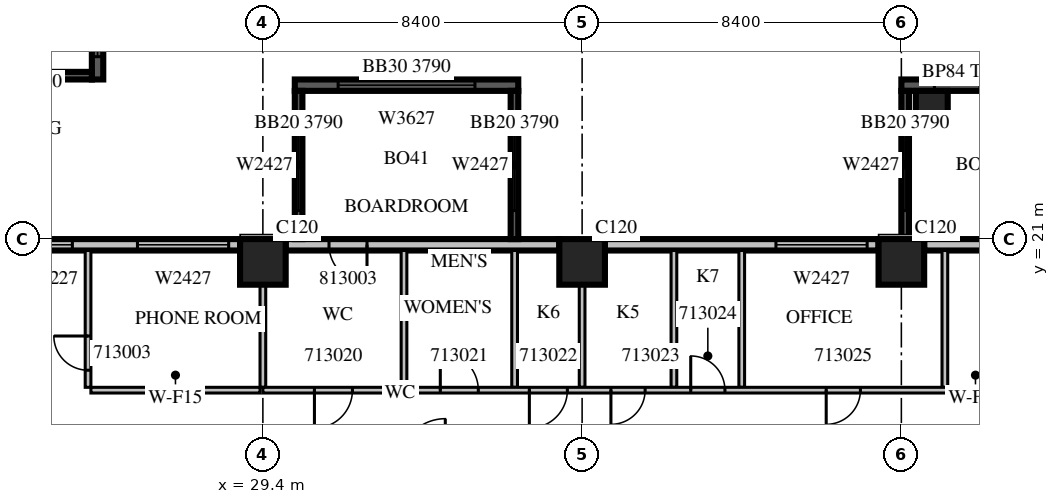
"""IFC4 building model, lengths in metres.
Left out: names, types, materials, properties, quantities, classifications, styles, units other than length and angle.
Written with IfcOpenShell. Run it as: python <this file> out.ifc"""

import sys

from ifc_helpers import new_model, si_unit, direction, frame, frame_2d, origin, origin_2d, place, context, subcontext, project, spatial, rectangle, extrude, source, transform, mapped, element, fill, save


model = new_model("IFC4")
c1 = context("Model", 3, precision=1e-05, world=origin(), true_north=direction((0.0, 1.0)))
c2 = subcontext(c1, "Body", "Model", "MODEL_VIEW")
j1 = project(units=[si_unit("LENGTHUNIT", "METRE"), si_unit("PLANEANGLEUNIT", "RADIAN")], contexts=[c1])
p1 = place(None, origin())
s1 = spatial("IfcSite", under=j1, at=p1, CompositionType="ELEMENT")
p2 = place(p1, origin())
s2 = spatial("IfcBuilding", under=s1, at=p2, CompositionType="ELEMENT")
p3 = place(p2, frame((0.0, 0.0, 65.7)))
s3 = spatial("IfcBuildingStorey", under=s2, at=p3, CompositionType="ELEMENT", Elevation=65.7)
m1 = source(origin(), c2, "Body", "SweptSolid", [
    extrude(rectangle(XDim=1.2, YDim=1.2, at=origin_2d()), origin(), (0.0, 0.0, 1.0), 4.2),
])
for number, where, z_axis, x_axis in (
    (1, (29.4, 20.4, 0.0), (0.0, 0.0, 1.0), (1.0, 0.0, 0.0)),
    (2, (37.8, 20.4, 0.0), (0.0, 0.0, 1.0), (1.0, 0.0, 0.0)),
    (3, (46.2, 20.4, 0.0), (0.0, 0.0, 1.0), (1.0, 0.0, 0.0)),
):
    element("IfcColumn", number, at=place(p3, frame(where, z_axis=z_axis, x_axis=x_axis)), inside=s3, PredefinedType="COLUMN", context=c2, shape_type="MappedRepresentation", body=[
        mapped(m1, transform((0.0, 0.0, 0.0), scale=1.0)),
    ])
m2 = source(origin(), c2, "Body", "SweptSolid", [
    extrude(rectangle(XDim=0.84, YDim=0.84, at=origin_2d()), origin(), (0.0, 0.0, 1.0), 4.2),
])
p4 = place(p3, frame((47.0, 24.48, 0.0), z_axis=(0.0, 0.0, 1.0), x_axis=(1.0, 0.0, 0.0)))
e4 = element("IfcColumn", 4, at=p4, inside=s3, PredefinedType="COLUMN", context=c2, shape_type="MappedRepresentation", body=[
    mapped(m2, transform((0.0, 0.0, 0.0), scale=1.0)),
])
m3 = source(origin(), c2, "Body", "SweptSolid", [
    extrude(rectangle(XDim=11.76, YDim=0.3, at=frame_2d((5.88, 0.0))), origin(), (0.0, 0.0, 1.0), 3.79),
])
p5 = place(p3, frame((57.96, 25.05, 0.0), z_axis=(0.0, 0.0, 1.0), x_axis=(-1.0, 0.0, 0.0)))
e5 = element("IfcWall", 5, at=p5, inside=s3, PredefinedType="SOLIDWALL", context=c2, shape_type="MappedRepresentation", body=[
    mapped(m3, transform((0.0, 0.0, 0.0), scale=1.0)),
])
m4 = source(origin(), c2, "Body", "SweptSolid", [
    extrude(rectangle(XDim=1.2, YDim=2.7, at=frame_2d((0.6, 1.35))), frame((0.0, 0.16, 0.0), z_axis=(0.0, -1.0, 0.0), x_axis=(1.0, 0.0, 0.0)), (0.0, 0.0, 1.0), 0.32),
])
p6 = place(p5, frame((0.87, 0.0, 0.6)))
e6 = element("IfcOpeningElement", 6, at=p6, cuts=e5, PredefinedType="OPENING", context=c2, shape_type="MappedRepresentation", body=[
    mapped(m4, transform((0.0, 0.0, 0.0), scale=1.0)),
])
p7 = place(p5, frame((3.81, 0.0, 0.6)))
e7 = element("IfcOpeningElement", 7, at=p7, cuts=e5, PredefinedType="OPENING", context=c2, shape_type="MappedRepresentation", body=[
    mapped(m4, transform((0.0, 0.0, 0.0), scale=1.0)),
])
p8 = place(p5, frame((6.75, 0.0, 0.6)))
e8 = element("IfcOpeningElement", 8, at=p8, cuts=e5, PredefinedType="OPENING", context=c2, shape_type="MappedRepresentation", body=[
    mapped(m4, transform((0.0, 0.0, 0.0), scale=1.0)),
])
p9 = place(p5, frame((9.69, 0.0, 0.6)))
e9 = element("IfcOpeningElement", 9, at=p9, cuts=e5, PredefinedType="OPENING", context=c2, shape_type="MappedRepresentation", body=[
    mapped(m4, transform((0.0, 0.0, 0.0), scale=1.0)),
])
m5 = source(origin(), c2, "Body", "SweptSolid", [
    extrude(rectangle(XDim=3.9, YDim=0.2, at=frame_2d((1.95, 0.0))), origin(), (0.0, 0.0, 1.0), 3.79),
])
p10 = place(p3, frame((46.3, 21.0, 0.0), z_axis=(0.0, 0.0, 1.0), x_axis=(0.0, 1.0, 0.0)))
e10 = element("IfcWall", 10, at=p10, inside=s3, PredefinedType="SOLIDWALL", context=c2, shape_type="MappedRepresentation", body=[
    mapped(m5, transform((0.0, 0.0, 0.0), scale=1.0)),
])
m6 = source(origin(), c2, "Body", "SweptSolid", [
    extrude(rectangle(XDim=2.4, YDim=2.7, at=frame_2d((1.2, 1.35))), frame((0.0, 0.11, 0.0), z_axis=(0.0, -1.0, 0.0), x_axis=(1.0, 0.0, 0.0)), (0.0, 0.0, 1.0), 0.22),
])
p11 = place(p10, frame((0.75, 0.0, 0.6)))
e11 = element("IfcOpeningElement", 11, at=p11, cuts=e10, PredefinedType="OPENING", context=c2, shape_type="MappedRepresentation", body=[
    mapped(m6, transform((0.0, 0.0, 0.0), scale=1.0)),
])
m7 = source(origin(), c2, "Body", "SweptSolid", [
    extrude(rectangle(XDim=4.2, YDim=0.3, at=frame_2d((2.1, 0.0))), origin(), (0.0, 0.0, 1.0), 3.8),
])
p12 = place(p3, frame((25.05, 25.2, 0.0), z_axis=(0.0, 0.0, 1.0), x_axis=(0.0, 1.0, 0.0)))
e12 = element("IfcWall", 12, at=p12, inside=s3, PredefinedType="SOLIDWALL", context=c2, shape_type="MappedRepresentation", body=[
    mapped(m7, transform((0.0, 0.0, 0.0), scale=1.0)),
])
m8 = source(origin(), c2, "Body", "SweptSolid", [
    extrude(rectangle(XDim=3.0, YDim=2.7, at=frame_2d((1.5, 1.35))), frame((0.0, 0.16, 0.0), z_axis=(0.0, -1.0, 0.0), x_axis=(1.0, 0.0, 0.0)), (0.0, 0.0, 1.0), 0.32),
])
p13 = place(p12, frame((0.6, 0.0, 0.6)))
e13 = element("IfcOpeningElement", 13, at=p13, cuts=e12, PredefinedType="OPENING", context=c2, shape_type="MappedRepresentation", body=[
    mapped(m8, transform((0.0, 0.0, 0.0), scale=1.0)),
])
m9 = source(origin(), c2, "Body", "SweptSolid", [
    extrude(rectangle(XDim=3.9, YDim=0.2, at=frame_2d((1.95, 0.0))), origin(), (0.0, 0.0, 1.0), 3.8),
])
p14 = place(p3, frame((21.0, 25.3, 0.0), z_axis=(0.0, 0.0, 1.0), x_axis=(1.0, 0.0, 0.0)))
e14 = element("IfcWall", 14, at=p14, inside=s3, PredefinedType="SOLIDWALL", context=c2, shape_type="MappedRepresentation", body=[
    mapped(m9, transform((0.0, 0.0, 0.0), scale=1.0)),
])
p15 = place(p14, frame((0.75, 0.0, 0.6)))
e15 = element("IfcOpeningElement", 15, at=p15, cuts=e14, PredefinedType="OPENING", context=c2, shape_type="MappedRepresentation", body=[
    mapped(m6, transform((0.0, 0.0, 0.0), scale=1.0)),
])
m10 = source(origin(), c2, "Body", "SweptSolid", [
    extrude(rectangle(XDim=4.68, YDim=0.3, at=frame_2d((2.34, 0.0))), origin(), (0.0, 0.0, 1.0), 3.8),
])
p16 = place(p3, frame((51.48, 20.85, 0.0), z_axis=(0.0, 0.0, 1.0), x_axis=(-1.0, 0.0, 0.0)))
e16 = element("IfcWall", 16, at=p16, inside=s3, PredefinedType="STANDARD", context=c2, shape_type="MappedRepresentation", body=[
    mapped(m10, transform((0.0, 0.0, 0.0), scale=1.0)),
])
m11 = source(origin(), c2, "Body", "SweptSolid", [
    extrude(rectangle(XDim=1.0, YDim=2.1, at=frame_2d((0.5, 1.05))), frame((0.0, 0.16, 0.0), z_axis=(0.0, -1.0, 0.0), x_axis=(1.0, 0.0, 0.0)), (0.0, 0.0, 1.0), 0.32),
])
p17 = place(p16, frame((1.887, 0.0, 0.0)))
e17 = element("IfcOpeningElement", 17, at=p17, cuts=e16, PredefinedType="OPENING", context=c2, shape_type="MappedRepresentation", body=[
    mapped(m11, transform((0.0, 0.0, 0.0), scale=1.0)),
])
m12 = source(origin(), c2, "Body", "SweptSolid", [
    extrude(rectangle(XDim=7.2, YDim=0.3, at=frame_2d((3.6, 0.0))), origin(), (0.0, 0.0, 1.0), 3.8),
])
p18 = place(p3, frame((45.6, 20.85, 0.0), z_axis=(0.0, 0.0, 1.0), x_axis=(-1.0, 0.0, 0.0)))
e18 = element("IfcWall", 18, at=p18, inside=s3, PredefinedType="STANDARD", context=c2, shape_type="MappedRepresentation", body=[
    mapped(m12, transform((0.0, 0.0, 0.0), scale=1.0)),
])
m13 = source(origin(), c2, "Body", "SweptSolid", [
    extrude(rectangle(XDim=2.4, YDim=2.7, at=frame_2d((1.2, 1.35))), frame((0.0, 0.16, 0.0), z_axis=(0.0, -1.0, 0.0), x_axis=(1.0, 0.0, 0.0)), (0.0, 0.0, 1.0), 0.32),
])
p19 = place(p18, frame((0.3, 0.0, 0.6)))
e19 = element("IfcOpeningElement", 19, at=p19, cuts=e18, PredefinedType="OPENING", context=c2, shape_type="MappedRepresentation", body=[
    mapped(m13, transform((0.0, 0.0, 0.0), scale=1.0)),
])
p20 = place(p3, frame((37.2, 20.85, 0.0), z_axis=(0.0, 0.0, 1.0), x_axis=(-1.0, 0.0, 0.0)))
e20 = element("IfcWall", 20, at=p20, inside=s3, PredefinedType="STANDARD", context=c2, shape_type="MappedRepresentation", body=[
    mapped(m12, transform((0.0, 0.0, 0.0), scale=1.0)),
])
p21 = place(p20, frame((5.06, 0.0, 0.0)))
e21 = element("IfcOpeningElement", 21, at=p21, cuts=e20, PredefinedType="OPENING", context=c2, shape_type="MappedRepresentation", body=[
    mapped(m11, transform((0.0, 0.0, 0.0), scale=1.0)),
])
m14 = source(origin(), c2, "Body", "SweptSolid", [
    extrude(rectangle(XDim=6.6, YDim=0.3, at=frame_2d((3.3, 0.0))), origin(), (0.0, 0.0, 1.0), 3.8),
])
p22 = place(p3, frame((28.8, 20.85, 0.0), z_axis=(0.0, 0.0, 1.0), x_axis=(-1.0, 0.0, 0.0)))
e22 = element("IfcWall", 22, at=p22, inside=s3, PredefinedType="STANDARD", context=c2, shape_type="MappedRepresentation", body=[
    mapped(m14, transform((0.0, 0.0, 0.0), scale=1.0)),
])
p23 = place(p22, frame((0.3, 0.0, 0.6)))
e23 = element("IfcOpeningElement", 23, at=p23, cuts=e22, PredefinedType="OPENING", context=c2, shape_type="MappedRepresentation", body=[
    mapped(m13, transform((0.0, 0.0, 0.0), scale=1.0)),
])
p24 = place(p22, frame((4.412, 0.0, 0.6)))
e24 = element("IfcOpeningElement", 24, at=p24, cuts=e22, PredefinedType="OPENING", context=c2, shape_type="MappedRepresentation", body=[
    mapped(m4, transform((0.0, 0.0, 0.0), scale=1.0)),
])
m15 = source(origin(), c2, "Body", "SweptSolid", [
    extrude(rectangle(XDim=5.88, YDim=0.3, at=frame_2d((2.94, 0.0))), origin(), (0.0, 0.0, 1.0), 3.79),
])
p25 = place(p3, frame((36.12, 25.05, 0.0), z_axis=(0.0, 0.0, 1.0), x_axis=(-1.0, 0.0, 0.0)))
e25 = element("IfcWall", 25, at=p25, inside=s3, PredefinedType="SOLIDWALL", context=c2, shape_type="MappedRepresentation", body=[
    mapped(m15, transform((0.0, 0.0, 0.0), scale=1.0)),
])
m16 = source(origin(), c2, "Body", "SweptSolid", [
    extrude(rectangle(XDim=3.6, YDim=2.7, at=frame_2d((1.8, 1.35))), frame((0.0, 0.16, 0.0), z_axis=(0.0, -1.0, 0.0), x_axis=(1.0, 0.0, 0.0)), (0.0, 0.0, 1.0), 0.32),
])
p26 = place(p25, frame((1.14, 0.0, 0.6)))
e26 = element("IfcOpeningElement", 26, at=p26, cuts=e25, PredefinedType="OPENING", context=c2, shape_type="MappedRepresentation", body=[
    mapped(m16, transform((0.0, 0.0, 0.0), scale=1.0)),
])
p27 = place(p3, frame((36.02, 21.0, 0.0), z_axis=(0.0, 0.0, 1.0), x_axis=(0.0, 1.0, 0.0)))
e27 = element("IfcWall", 27, at=p27, inside=s3, PredefinedType="SOLIDWALL", context=c2, shape_type="MappedRepresentation", body=[
    mapped(m5, transform((0.0, 0.0, 0.0), scale=1.0)),
])
p28 = place(p27, frame((0.75, 0.0, 0.6)))
e28 = element("IfcOpeningElement", 28, at=p28, cuts=e27, PredefinedType="OPENING", context=c2, shape_type="MappedRepresentation", body=[
    mapped(m6, transform((0.0, 0.0, 0.0), scale=1.0)),
])
p29 = place(p3, frame((30.34, 21.0, 0.0), z_axis=(0.0, 0.0, 1.0), x_axis=(0.0, 1.0, 0.0)))
e29 = element("IfcWall", 29, at=p29, inside=s3, PredefinedType="SOLIDWALL", context=c2, shape_type="MappedRepresentation", body=[
    mapped(m5, transform((0.0, 0.0, 0.0), scale=1.0)),
])
p30 = place(p29, frame((0.75, 0.0, 0.6)))
e30 = element("IfcOpeningElement", 30, at=p30, cuts=e29, PredefinedType="OPENING", context=c2, shape_type="MappedRepresentation", body=[
    mapped(m6, transform((0.0, 0.0, 0.0), scale=1.0)),
])
m17 = source(origin(), c2, "Body", "SweptSolid", [
    extrude(rectangle(XDim=3.6, YDim=0.15, at=frame_2d((1.8, 0.0))), origin(), (0.0, 0.0, 1.0), 3.8),
])
p31 = place(p3, frame((24.8, 20.7, 0.0), z_axis=(0.0, 0.0, 1.0), x_axis=(0.0, -1.0, 0.0)))
e31 = element("IfcWall", 31, at=p31, inside=s3, PredefinedType="PARTITIONING", context=c2, shape_type="MappedRepresentation", body=[
    mapped(m17, transform((0.0, 0.0, 0.0), scale=1.0)),
])
m18 = source(origin(), c2, "Body", "SweptSolid", [
    extrude(rectangle(XDim=0.9, YDim=2.1, at=frame_2d((0.45, 1.05))), frame((0.0, 0.085, 0.0), z_axis=(0.0, -1.0, 0.0), x_axis=(1.0, 0.0, 0.0)), (0.0, 0.0, 1.0), 0.17),
])
p32 = place(p31, frame((2.25, 0.0, 0.0)))
e32 = element("IfcOpeningElement", 32, at=p32, cuts=e31, PredefinedType="OPENING", context=c2, shape_type="MappedRepresentation", body=[
    mapped(m18, transform((0.0, 0.0, 0.0), scale=1.0)),
])
m19 = source(origin(), c2, "Body", "SweptSolid", [
    extrude(rectangle(XDim=4.45, YDim=0.15, at=frame_2d((2.225, 0.0))), origin(), (0.0, 0.0, 1.0), 3.8),
])
p33 = place(p3, frame((24.875, 17.025, 0.0), z_axis=(0.0, 0.0, 1.0), x_axis=(1.0, 0.0, 0.0)))
e33 = element("IfcWall", 33, at=p33, inside=s3, PredefinedType="PARTITIONING", context=c2, shape_type="MappedRepresentation", body=[
    mapped(m19, transform((0.0, 0.0, 0.0), scale=1.0)),
])
m20 = source(origin(), c2, "Body", "SweptSolid", [
    extrude(rectangle(XDim=2.701, YDim=0.15, at=frame_2d((1.351, 0.0))), origin(), (0.0, 0.0, 1.0), 3.8),
])
p34 = place(p3, frame((29.4, 17.1, 0.0), z_axis=(0.0, 0.0, 1.0), x_axis=(0.0, 1.0, 0.0)))
e34 = element("IfcWall", 34, at=p34, inside=s3, PredefinedType="PARTITIONING", context=c2, shape_type="MappedRepresentation", body=[
    mapped(m20, transform((0.0, 0.0, 0.0), scale=1.0)),
])
for number, where, z_axis, x_axis in (
    (35, (33.113, 20.7, 0.0), (0.0, 0.0, 1.0), (0.0, -1.0, 0.0)),
    (36, (36.024, 20.7, 0.0), (0.0, 0.0, 1.0), (0.0, -1.0, 0.0)),
    (37, (40.216, 20.7, 0.0), (0.0, 0.0, 1.0), (0.0, -1.0, 0.0)),
    (38, (47.345, 20.7, 0.0), (0.0, 0.0, 1.0), (0.0, -1.0, 0.0)),
):
    element("IfcWall", number, at=place(p3, frame(where, z_axis=z_axis, x_axis=x_axis)), inside=s3, PredefinedType="PARTITIONING", context=c2, shape_type="MappedRepresentation", body=[
        mapped(m17, transform((0.0, 0.0, 0.0), scale=1.0)),
    ])
p35 = place(p3, frame((37.8, 17.1, 0.0), z_axis=(0.0, 0.0, 1.0), x_axis=(0.0, 1.0, 0.0)))
e39 = element("IfcWall", 39, at=p35, inside=s3, PredefinedType="PARTITIONING", context=c2, shape_type="MappedRepresentation", body=[
    mapped(m20, transform((0.0, 0.0, 0.0), scale=1.0)),
])
p36 = place(p3, frame((42.0, 17.1, 0.0), z_axis=(0.0, 0.0, 1.0), x_axis=(0.0, 1.0, 0.0)))
e40 = element("IfcWall", 40, at=p36, inside=s3, PredefinedType="PARTITIONING", context=c2, shape_type="MappedRepresentation", body=[
    mapped(m17, transform((0.0, 0.0, 0.0), scale=1.0)),
])
m21 = source(origin(), c2, "Body", "SweptSolid", [
    extrude(rectangle(XDim=37.5, YDim=0.15, at=frame_2d((18.75, 0.0))), origin(), (0.0, 0.0, 1.0), 3.8),
])
p37 = place(p3, frame((29.4, 17.025, 0.0), z_axis=(0.0, 0.0, 1.0), x_axis=(1.0, 0.0, 0.0)))
e41 = element("IfcWall", 41, at=p37, inside=s3, PredefinedType="PARTITIONING", context=c2, shape_type="MappedRepresentation", body=[
    mapped(m21, transform((0.0, 0.0, 0.0), scale=1.0)),
])
m22 = source(origin(), c2, "Body", "SweptSolid", [
    extrude(rectangle(XDim=1.0, YDim=2.1, at=frame_2d((0.5, 1.05))), frame((0.0, 0.085, 0.0), z_axis=(0.0, -1.0, 0.0), x_axis=(1.0, 0.0, 0.0)), (0.0, 0.0, 1.0), 0.17),
])
p38 = place(p37, frame((1.357, 0.0, 0.0)))
e42 = element("IfcOpeningElement", 42, at=p38, cuts=e41, PredefinedType="OPENING", context=c2, shape_type="MappedRepresentation", body=[
    mapped(m22, transform((0.0, 0.0, 0.0), scale=1.0)),
])
p39 = place(p37, frame((4.669, 0.0, 0.0)))
e43 = element("IfcOpeningElement", 43, at=p39, cuts=e41, PredefinedType="OPENING", context=c2, shape_type="MappedRepresentation", body=[
    mapped(m22, transform((0.0, 0.0, 0.0), scale=1.0)),
])
p40 = place(p37, frame((7.012, 0.0, 0.0)))
e44 = element("IfcOpeningElement", 44, at=p40, cuts=e41, PredefinedType="OPENING", context=c2, shape_type="MappedRepresentation", body=[
    mapped(m22, transform((0.0, 0.0, 0.0), scale=1.0)),
])
p41 = place(p37, frame((9.158, 0.0, 0.0)))
e45 = element("IfcOpeningElement", 45, at=p41, cuts=e41, PredefinedType="OPENING", context=c2, shape_type="MappedRepresentation", body=[
    mapped(m18, transform((0.0, 0.0, 0.0), scale=1.0)),
])
p42 = place(p37, frame((11.258, 0.0, 0.0)))
e46 = element("IfcOpeningElement", 46, at=p42, cuts=e41, PredefinedType="OPENING", context=c2, shape_type="MappedRepresentation", body=[
    mapped(m18, transform((0.0, 0.0, 0.0), scale=1.0)),
])
p43 = place(p37, frame((14.822, 0.0, 0.0)))
e47 = element("IfcOpeningElement", 47, at=p43, cuts=e41, PredefinedType="OPENING", context=c2, shape_type="MappedRepresentation", body=[
    mapped(m18, transform((0.0, 0.0, 0.0), scale=1.0)),
])
p44 = place(p37, frame((20.13, 0.0, 0.0)))
e48 = element("IfcOpeningElement", 48, at=p44, cuts=e41, PredefinedType="OPENING", context=c2, shape_type="MappedRepresentation", body=[
    mapped(m18, transform((0.0, 0.0, 0.0), scale=1.0)),
])
p45 = place(p37, frame((25.438, 0.0, 0.0)))
e49 = element("IfcOpeningElement", 49, at=p45, cuts=e41, PredefinedType="OPENING", context=c2, shape_type="MappedRepresentation", body=[
    mapped(m18, transform((0.0, 0.0, 0.0), scale=1.0)),
])
p46 = place(p37, frame((30.364, 0.0, 0.0)))
e50 = element("IfcOpeningElement", 50, at=p46, cuts=e41, PredefinedType="OPENING", context=c2, shape_type="MappedRepresentation", body=[
    mapped(m18, transform((0.0, 0.0, 0.0), scale=1.0)),
])
p47 = place(p37, frame((34.871, 0.0, 0.0)))
e51 = element("IfcOpeningElement", 51, at=p47, cuts=e41, PredefinedType="OPENING", context=c2, shape_type="MappedRepresentation", body=[
    mapped(m18, transform((0.0, 0.0, 0.0), scale=1.0)),
])
m23 = source(origin(), c2, "Body", "SweptSolid", [
    extrude(rectangle(XDim=1.2, YDim=2.7, at=frame_2d((0.6, 1.35))), frame((0.0, 0.03, 0.0), z_axis=(0.0, -1.0, 0.0), x_axis=(1.0, 0.0, 0.0)), (0.0, 0.0, 1.0), 0.06),
])
p48 = place(p9, origin())
e52 = element("IfcWindow", 52, at=p48, inside=s3, PartitioningType="SINGLE_PANEL", PredefinedType="WINDOW", context=c2, shape_type="MappedRepresentation", body=[
    mapped(m23, transform((0.0, 0.0, 0.0), scale=1.0)),
])
fill(e9, e52)
m24 = source(origin(), c2, "Body", "SweptSolid", [
    extrude(rectangle(XDim=2.4, YDim=2.7, at=frame_2d((1.2, 1.35))), frame((0.0, 0.03, 0.0), z_axis=(0.0, -1.0, 0.0), x_axis=(1.0, 0.0, 0.0)), (0.0, 0.0, 1.0), 0.06),
])
p49 = place(p11, origin())
e53 = element("IfcWindow", 53, at=p49, inside=s3, PartitioningType="SINGLE_PANEL", PredefinedType="WINDOW", context=c2, shape_type="MappedRepresentation", body=[
    mapped(m24, transform((0.0, 0.0, 0.0), scale=1.0)),
])
fill(e11, e53)
m25 = source(origin(), c2, "Body", "SweptSolid", [
    extrude(rectangle(XDim=3.0, YDim=2.7, at=frame_2d((1.5, 1.35))), frame((0.0, 0.03, 0.0), z_axis=(0.0, -1.0, 0.0), x_axis=(1.0, 0.0, 0.0)), (0.0, 0.0, 1.0), 0.06),
])
p50 = place(p13, origin())
e54 = element("IfcWindow", 54, at=p50, inside=s3, PartitioningType="SINGLE_PANEL", PredefinedType="WINDOW", context=c2, shape_type="MappedRepresentation", body=[
    mapped(m25, transform((0.0, 0.0, 0.0), scale=1.0)),
])
fill(e13, e54)
p51 = place(p15, origin())
e55 = element("IfcWindow", 55, at=p51, inside=s3, PartitioningType="SINGLE_PANEL", PredefinedType="WINDOW", context=c2, shape_type="MappedRepresentation", body=[
    mapped(m24, transform((0.0, 0.0, 0.0), scale=1.0)),
])
fill(e15, e55)
p52 = place(p19, origin())
e56 = element("IfcWindow", 56, at=p52, inside=s3, PartitioningType="SINGLE_PANEL", PredefinedType="WINDOW", context=c2, shape_type="MappedRepresentation", body=[
    mapped(m24, transform((0.0, 0.0, 0.0), scale=1.0)),
])
fill(e19, e56)
p53 = place(p23, origin())
e57 = element("IfcWindow", 57, at=p53, inside=s3, PartitioningType="SINGLE_PANEL", PredefinedType="WINDOW", context=c2, shape_type="MappedRepresentation", body=[
    mapped(m24, transform((0.0, 0.0, 0.0), scale=1.0)),
])
fill(e23, e57)
p54 = place(p24, origin())
e58 = element("IfcWindow", 58, at=p54, inside=s3, PartitioningType="SINGLE_PANEL", PredefinedType="WINDOW", context=c2, shape_type="MappedRepresentation", body=[
    mapped(m23, transform((0.0, 0.0, 0.0), scale=1.0)),
])
fill(e24, e58)
m26 = source(origin(), c2, "Body", "SweptSolid", [
    extrude(rectangle(XDim=3.6, YDim=2.7, at=frame_2d((1.8, 1.35))), frame((0.0, 0.03, 0.0), z_axis=(0.0, -1.0, 0.0), x_axis=(1.0, 0.0, 0.0)), (0.0, 0.0, 1.0), 0.06),
])
p55 = place(p26, origin())
e59 = element("IfcWindow", 59, at=p55, inside=s3, PartitioningType="SINGLE_PANEL", PredefinedType="WINDOW", context=c2, shape_type="MappedRepresentation", body=[
    mapped(m26, transform((0.0, 0.0, 0.0), scale=1.0)),
])
fill(e26, e59)
p56 = place(p28, origin())
e60 = element("IfcWindow", 60, at=p56, inside=s3, PartitioningType="SINGLE_PANEL", PredefinedType="WINDOW", context=c2, shape_type="MappedRepresentation", body=[
    mapped(m24, transform((0.0, 0.0, 0.0), scale=1.0)),
])
fill(e28, e60)
p57 = place(p30, origin())
e61 = element("IfcWindow", 61, at=p57, inside=s3, PartitioningType="SINGLE_PANEL", PredefinedType="WINDOW", context=c2, shape_type="MappedRepresentation", body=[
    mapped(m24, transform((0.0, 0.0, 0.0), scale=1.0)),
])
fill(e30, e61)
m27 = source(origin(), c2, "Body", "SweptSolid", [
    extrude(rectangle(XDim=0.9, YDim=2.1, at=frame_2d((0.45, 1.05))), frame((0.0, 0.025, 0.0), z_axis=(0.0, -1.0, 0.0), x_axis=(1.0, 0.0, 0.0)), (0.0, 0.0, 1.0), 0.05),
])
p58 = place(p32, origin())
e62 = element("IfcDoor", 62, at=p58, inside=s3, OperationType="SINGLE_SWING_RIGHT", PredefinedType="DOOR", context=c2, shape_type="MappedRepresentation", body=[
    mapped(m27, transform((0.0, 0.0, 0.0), scale=1.0)),
])
fill(e32, e62)
m28 = source(origin(), c2, "Body", "SweptSolid", [
    extrude(rectangle(XDim=1.0, YDim=2.1, at=frame_2d((0.5, 1.05))), frame((0.0, 0.025, 0.0), z_axis=(0.0, -1.0, 0.0), x_axis=(1.0, 0.0, 0.0)), (0.0, 0.0, 1.0), 0.05),
])
p59 = place(p38, origin())
e63 = element("IfcDoor", 63, at=p59, inside=s3, OperationType="SINGLE_SWING_RIGHT", PredefinedType="DOOR", context=c2, shape_type="MappedRepresentation", body=[
    mapped(m28, transform((0.0, 0.0, 0.0), scale=1.0)),
])
fill(e42, e63)
p60 = place(p39, origin())
e64 = element("IfcDoor", 64, at=p60, inside=s3, OperationType="SINGLE_SWING_LEFT", PredefinedType="DOOR", context=c2, shape_type="MappedRepresentation", body=[
    mapped(m28, transform((0.0, 0.0, 0.0), scale=1.0)),
])
fill(e43, e64)
p61 = place(p40, origin())
e65 = element("IfcDoor", 65, at=p61, inside=s3, OperationType="SINGLE_SWING_RIGHT", PredefinedType="DOOR", context=c2, shape_type="MappedRepresentation", body=[
    mapped(m28, transform((0.0, 0.0, 0.0), scale=1.0)),
])
fill(e44, e65)
p62 = place(p41, origin())
e66 = element("IfcDoor", 66, at=p62, inside=s3, OperationType="SINGLE_SWING_RIGHT", PredefinedType="DOOR", context=c2, shape_type="MappedRepresentation", body=[
    mapped(m27, transform((0.0, 0.0, 0.0), scale=1.0)),
])
fill(e45, e66)
p63 = place(p42, origin())
e67 = element("IfcDoor", 67, at=p63, inside=s3, OperationType="SINGLE_SWING_LEFT", PredefinedType="DOOR", context=c2, shape_type="MappedRepresentation", body=[
    mapped(m27, transform((0.0, 0.0, 0.0), scale=1.0)),
])
fill(e46, e67)
p64 = place(p43, origin())
e68 = element("IfcDoor", 68, at=p64, inside=s3, OperationType="SINGLE_SWING_RIGHT", PredefinedType="DOOR", context=c2, shape_type="MappedRepresentation", body=[
    mapped(m27, transform((0.0, 0.0, 0.0), scale=1.0)),
])
fill(e47, e68)
p65 = place(p21, origin())
e69 = element("IfcDoor", 69, at=p65, inside=s3, OperationType="SINGLE_SWING_LEFT", PredefinedType="DOOR", context=c2, shape_type="MappedRepresentation", body=[
    mapped(m28, transform((0.0, 0.0, 0.0), scale=1.0)),
])
fill(e21, e69)
save(model, sys.argv[1])
